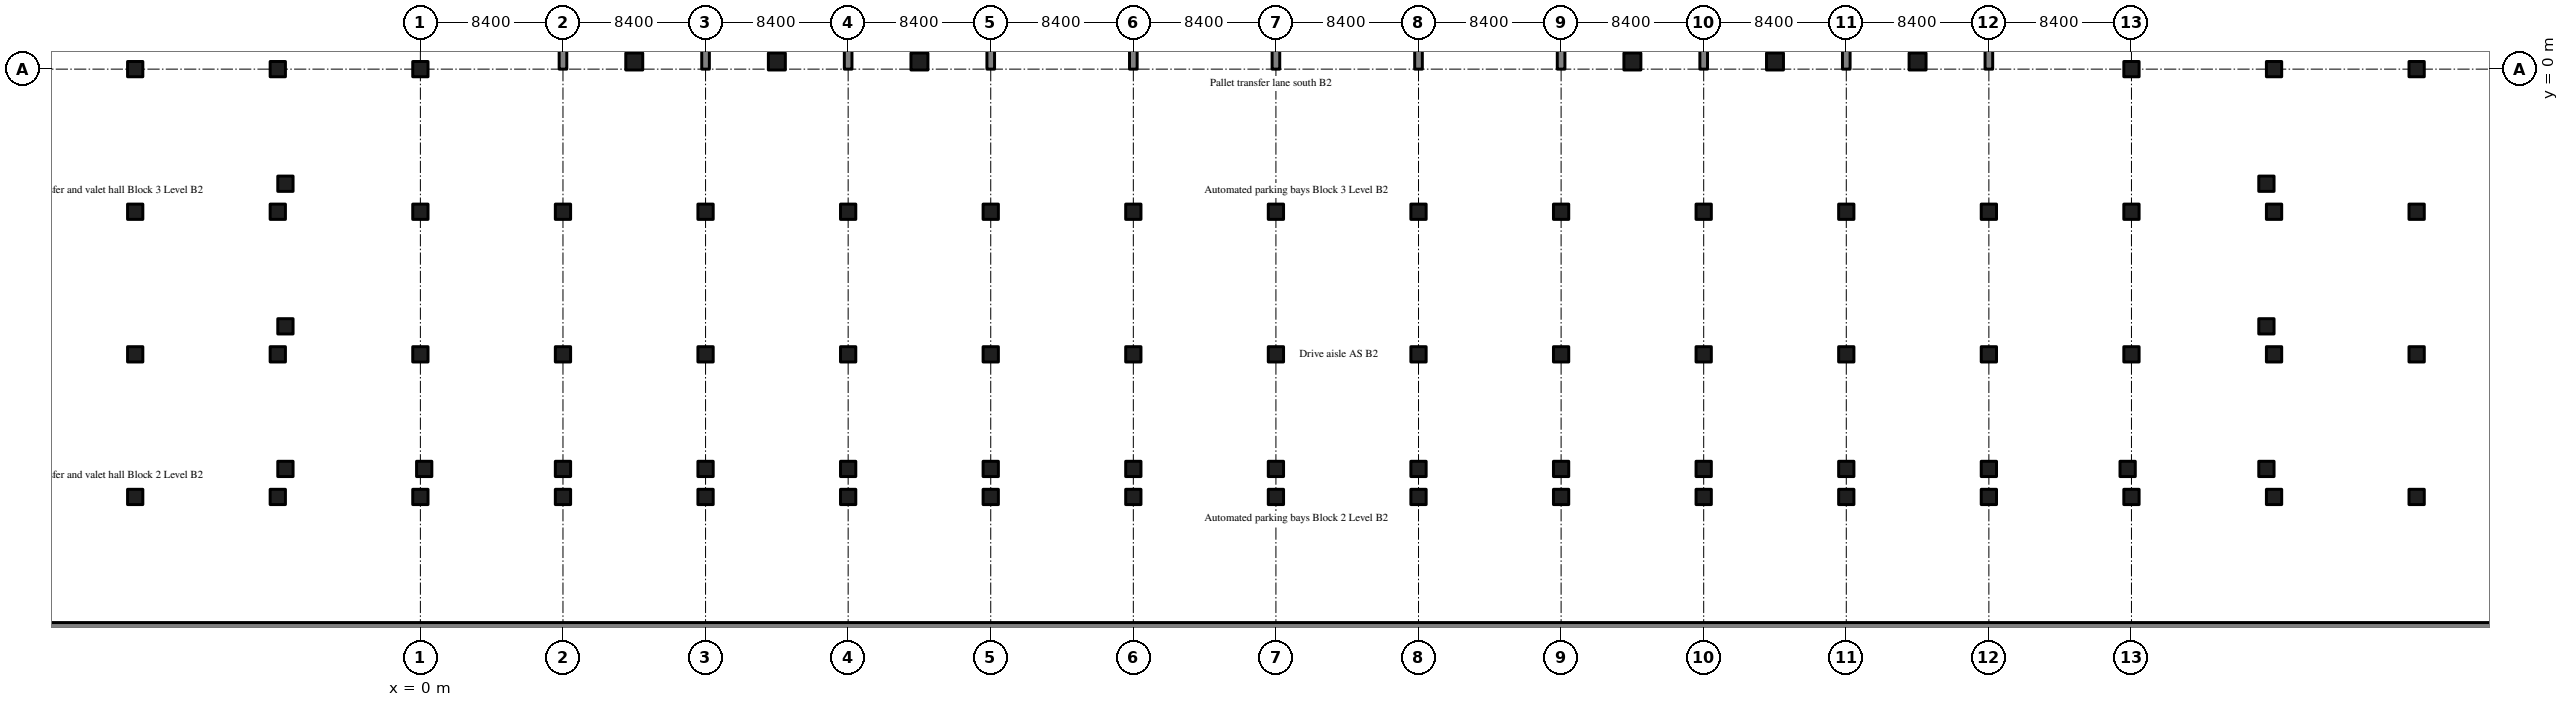
"""IFC4 building model, lengths in metres.
Left out: names, types, materials, properties, quantities, classifications, styles, units other than length and angle.
Written with IfcOpenShell. Run it as: python <this file> out.ifc"""

import sys

from ifc_helpers import new_model, si_unit, direction, frame, frame_2d, origin, origin_2d, place, context, subcontext, project, spatial, rectangle, extrude, source, transform, mapped, element, save


model = new_model("IFC4")
c1 = context("Model", 3, precision=1e-05, world=origin(), true_north=direction((0.0, 1.0)))
c2 = subcontext(c1, "Body", "Model", "MODEL_VIEW")
j1 = project(units=[si_unit("LENGTHUNIT", "METRE"), si_unit("PLANEANGLEUNIT", "RADIAN")], contexts=[c1])
p1 = place(None, origin())
s1 = spatial("IfcSite", under=j1, at=p1, CompositionType="ELEMENT")
p2 = place(p1, origin())
s2 = spatial("IfcBuilding", under=s1, at=p2, CompositionType="ELEMENT")
p3 = place(p2, frame((0.0, 0.0, -9.0)))
s3 = spatial("IfcBuildingStorey", under=s2, at=p3, CompositionType="ELEMENT", Elevation=-9.0)
m1 = source(origin(), c2, "Body", "SweptSolid", [
    extrude(rectangle(XDim=151.2, YDim=1.0, at=frame_2d((75.6, 0.0))), origin(), (0.0, 0.0, 1.0), 4.22),
])
p4 = place(p3, frame((-25.2, -33.1, 0.0), z_axis=(0.0, 0.0, 1.0), x_axis=(1.0, 0.0, 0.0)))
e1 = element("IfcWall", 1, at=p4, inside=s3, PredefinedType="SHEAR", context=c2, shape_type="MappedRepresentation", body=[
    mapped(m1, transform((0.0, 0.0, 0.0), scale=1.0)),
])
m2 = source(origin(), c2, "Body", "SweptSolid", [
    extrude(rectangle(XDim=19.6, YDim=0.45, at=frame_2d((9.8, 0.0))), origin(), (0.0, 0.0, 1.0), 4.22),
])
for number, where, z_axis, x_axis in (
    (2, (8.4, 0.0, 0.0), (0.0, 0.0, 1.0), (0.0, 1.0, 0.0)),
    (3, (16.8, 0.0, 0.0), (0.0, 0.0, 1.0), (0.0, 1.0, 0.0)),
    (4, (25.2, 0.0, 0.0), (0.0, 0.0, 1.0), (0.0, 1.0, 0.0)),
    (5, (33.6, 0.0, 0.0), (0.0, 0.0, 1.0), (0.0, 1.0, 0.0)),
    (6, (42.0, 0.0, 0.0), (0.0, 0.0, 1.0), (0.0, 1.0, 0.0)),
    (7, (50.4, 0.0, 0.0), (0.0, 0.0, 1.0), (0.0, 1.0, 0.0)),
    (8, (58.8, 0.0, 0.0), (0.0, 0.0, 1.0), (0.0, 1.0, 0.0)),
    (9, (67.2, 0.0, 0.0), (0.0, 0.0, 1.0), (0.0, 1.0, 0.0)),
    (10, (75.6, 0.0, 0.0), (0.0, 0.0, 1.0), (0.0, 1.0, 0.0)),
    (11, (84.0, 0.0, 0.0), (0.0, 0.0, 1.0), (0.0, 1.0, 0.0)),
    (12, (92.4, 0.0, 0.0), (0.0, 0.0, 1.0), (0.0, 1.0, 0.0)),
):
    element("IfcWall", number, at=place(p3, frame(where, z_axis=z_axis, x_axis=x_axis)), inside=s3, PredefinedType="SHEAR", context=c2, shape_type="MappedRepresentation", body=[
        mapped(m2, transform((0.0, 0.0, 0.0), scale=1.0)),
    ])
m3 = source(origin(), c2, "Body", "SweptSolid", [
    extrude(rectangle(XDim=1.0, YDim=1.0, at=origin_2d()), origin(), (0.0, 0.0, 1.0), 4.22),
])
for number, where, z_axis, x_axis in (
    (13, (12.6, 0.45, 0.0), (0.0, 0.0, 1.0), (1.0, 0.0, 0.0)),
    (14, (21.0, 0.45, 0.0), (0.0, 0.0, 1.0), (1.0, 0.0, 0.0)),
    (15, (29.4, 0.45, 0.0), (0.0, 0.0, 1.0), (1.0, 0.0, 0.0)),
    (16, (71.4, 0.45, 0.0), (0.0, 0.0, 1.0), (1.0, 0.0, 0.0)),
    (17, (79.8, 0.45, 0.0), (0.0, 0.0, 1.0), (1.0, 0.0, 0.0)),
    (18, (88.2, 0.45, 0.0), (0.0, 0.0, 1.0), (1.0, 0.0, 0.0)),
):
    element("IfcColumn", number, at=place(p3, frame(where, z_axis=z_axis, x_axis=x_axis)), inside=s3, PredefinedType="COLUMN", context=c2, shape_type="MappedRepresentation", body=[
        mapped(m3, transform((0.0, 0.0, 0.0), scale=1.0)),
    ])
m4 = source(origin(), c2, "Body", "SweptSolid", [
    extrude(rectangle(XDim=0.9, YDim=0.9, at=origin_2d()), origin(), (0.0, 0.0, 1.0), 4.22),
])
for number, where, z_axis, x_axis in (
    (19, (-7.95, -23.55, 0.0), (0.0, 0.0, 1.0), (1.0, 0.0, 0.0)),
    (20, (108.75, -23.55, 0.0), (0.0, 0.0, 1.0), (1.0, 0.0, 0.0)),
    (21, (-7.95, -15.15, 0.0), (0.0, 0.0, 1.0), (1.0, 0.0, 0.0)),
    (22, (108.75, -15.15, 0.0), (0.0, 0.0, 1.0), (1.0, 0.0, 0.0)),
    (23, (-7.95, -6.75, 0.0), (0.0, 0.0, 1.0), (1.0, 0.0, 0.0)),
    (24, (108.75, -6.75, 0.0), (0.0, 0.0, 1.0), (1.0, 0.0, 0.0)),
    (25, (0.225, -23.55, 0.0), (0.0, 0.0, 1.0), (1.0, 0.0, 0.0)),
    (26, (8.4, -23.55, 0.0), (0.0, 0.0, 1.0), (1.0, 0.0, 0.0)),
    (27, (16.8, -23.55, 0.0), (0.0, 0.0, 1.0), (1.0, 0.0, 0.0)),
    (28, (25.2, -23.55, 0.0), (0.0, 0.0, 1.0), (1.0, 0.0, 0.0)),
    (29, (33.6, -23.55, 0.0), (0.0, 0.0, 1.0), (1.0, 0.0, 0.0)),
    (30, (42.0, -23.55, 0.0), (0.0, 0.0, 1.0), (1.0, 0.0, 0.0)),
    (31, (50.4, -23.55, 0.0), (0.0, 0.0, 1.0), (1.0, 0.0, 0.0)),
    (32, (58.8, -23.55, 0.0), (0.0, 0.0, 1.0), (1.0, 0.0, 0.0)),
    (33, (67.2, -23.55, 0.0), (0.0, 0.0, 1.0), (1.0, 0.0, 0.0)),
    (34, (75.6, -23.55, 0.0), (0.0, 0.0, 1.0), (1.0, 0.0, 0.0)),
    (35, (84.0, -23.55, 0.0), (0.0, 0.0, 1.0), (1.0, 0.0, 0.0)),
    (36, (92.4, -23.55, 0.0), (0.0, 0.0, 1.0), (1.0, 0.0, 0.0)),
    (37, (100.575, -23.55, 0.0), (0.0, 0.0, 1.0), (1.0, 0.0, 0.0)),
    (38, (-16.8, -25.2, 0.0), (0.0, 0.0, 1.0), (1.0, 0.0, 0.0)),
    (39, (-16.8, -16.8, 0.0), (0.0, 0.0, 1.0), (1.0, 0.0, 0.0)),
    (40, (-16.8, -8.4, 0.0), (0.0, 0.0, 1.0), (1.0, 0.0, 0.0)),
    (41, (-16.8, 0.0, 0.0), (0.0, 0.0, 1.0), (1.0, 0.0, 0.0)),
    (42, (-8.4, -25.2, 0.0), (0.0, 0.0, 1.0), (1.0, 0.0, 0.0)),
    (43, (-8.4, -16.8, 0.0), (0.0, 0.0, 1.0), (1.0, 0.0, 0.0)),
    (44, (-8.4, -8.4, 0.0), (0.0, 0.0, 1.0), (1.0, 0.0, 0.0)),
    (45, (-8.4, 0.0, 0.0), (0.0, 0.0, 1.0), (1.0, 0.0, 0.0)),
    (46, (0.0, -25.2, 0.0), (0.0, 0.0, 1.0), (1.0, 0.0, 0.0)),
    (47, (0.0, -16.8, 0.0), (0.0, 0.0, 1.0), (1.0, 0.0, 0.0)),
    (48, (0.0, -8.4, 0.0), (0.0, 0.0, 1.0), (1.0, 0.0, 0.0)),
    (49, (0.0, 0.0, 0.0), (0.0, 0.0, 1.0), (1.0, 0.0, 0.0)),
    (50, (8.4, -25.2, 0.0), (0.0, 0.0, 1.0), (1.0, 0.0, 0.0)),
    (51, (8.4, -16.8, 0.0), (0.0, 0.0, 1.0), (1.0, 0.0, 0.0)),
    (52, (8.4, -8.4, 0.0), (0.0, 0.0, 1.0), (1.0, 0.0, 0.0)),
    (53, (16.8, -25.2, 0.0), (0.0, 0.0, 1.0), (1.0, 0.0, 0.0)),
    (54, (16.8, -16.8, 0.0), (0.0, 0.0, 1.0), (1.0, 0.0, 0.0)),
    (55, (16.8, -8.4, 0.0), (0.0, 0.0, 1.0), (1.0, 0.0, 0.0)),
    (56, (25.2, -25.2, 0.0), (0.0, 0.0, 1.0), (1.0, 0.0, 0.0)),
    (57, (25.2, -16.8, 0.0), (0.0, 0.0, 1.0), (1.0, 0.0, 0.0)),
    (58, (25.2, -8.4, 0.0), (0.0, 0.0, 1.0), (1.0, 0.0, 0.0)),
    (59, (33.6, -25.2, 0.0), (0.0, 0.0, 1.0), (1.0, 0.0, 0.0)),
    (60, (33.6, -16.8, 0.0), (0.0, 0.0, 1.0), (1.0, 0.0, 0.0)),
    (61, (33.6, -8.4, 0.0), (0.0, 0.0, 1.0), (1.0, 0.0, 0.0)),
    (62, (42.0, -25.2, 0.0), (0.0, 0.0, 1.0), (1.0, 0.0, 0.0)),
    (63, (42.0, -16.8, 0.0), (0.0, 0.0, 1.0), (1.0, 0.0, 0.0)),
    (64, (42.0, -8.4, 0.0), (0.0, 0.0, 1.0), (1.0, 0.0, 0.0)),
    (65, (50.4, -25.2, 0.0), (0.0, 0.0, 1.0), (1.0, 0.0, 0.0)),
    (66, (50.4, -16.8, 0.0), (0.0, 0.0, 1.0), (1.0, 0.0, 0.0)),
    (67, (50.4, -8.4, 0.0), (0.0, 0.0, 1.0), (1.0, 0.0, 0.0)),
    (68, (58.8, -25.2, 0.0), (0.0, 0.0, 1.0), (1.0, 0.0, 0.0)),
    (69, (58.8, -16.8, 0.0), (0.0, 0.0, 1.0), (1.0, 0.0, 0.0)),
    (70, (58.8, -8.4, 0.0), (0.0, 0.0, 1.0), (1.0, 0.0, 0.0)),
    (71, (67.2, -25.2, 0.0), (0.0, 0.0, 1.0), (1.0, 0.0, 0.0)),
    (72, (67.2, -16.8, 0.0), (0.0, 0.0, 1.0), (1.0, 0.0, 0.0)),
    (73, (67.2, -8.4, 0.0), (0.0, 0.0, 1.0), (1.0, 0.0, 0.0)),
    (74, (75.6, -25.2, 0.0), (0.0, 0.0, 1.0), (1.0, 0.0, 0.0)),
    (75, (75.6, -16.8, 0.0), (0.0, 0.0, 1.0), (1.0, 0.0, 0.0)),
    (76, (75.6, -8.4, 0.0), (0.0, 0.0, 1.0), (1.0, 0.0, 0.0)),
    (77, (84.0, -25.2, 0.0), (0.0, 0.0, 1.0), (1.0, 0.0, 0.0)),
    (78, (84.0, -16.8, 0.0), (0.0, 0.0, 1.0), (1.0, 0.0, 0.0)),
    (79, (84.0, -8.4, 0.0), (0.0, 0.0, 1.0), (1.0, 0.0, 0.0)),
    (80, (92.4, -25.2, 0.0), (0.0, 0.0, 1.0), (1.0, 0.0, 0.0)),
    (81, (92.4, -16.8, 0.0), (0.0, 0.0, 1.0), (1.0, 0.0, 0.0)),
    (82, (92.4, -8.4, 0.0), (0.0, 0.0, 1.0), (1.0, 0.0, 0.0)),
    (83, (100.8, -25.2, 0.0), (0.0, 0.0, 1.0), (1.0, 0.0, 0.0)),
    (84, (100.8, -16.8, 0.0), (0.0, 0.0, 1.0), (1.0, 0.0, 0.0)),
    (85, (100.8, -8.4, 0.0), (0.0, 0.0, 1.0), (1.0, 0.0, 0.0)),
    (86, (100.8, 0.0, 0.0), (0.0, 0.0, 1.0), (1.0, 0.0, 0.0)),
    (87, (109.2, -25.2, 0.0), (0.0, 0.0, 1.0), (1.0, 0.0, 0.0)),
    (88, (109.2, -16.8, 0.0), (0.0, 0.0, 1.0), (1.0, 0.0, 0.0)),
    (89, (109.2, -8.4, 0.0), (0.0, 0.0, 1.0), (1.0, 0.0, 0.0)),
    (90, (109.2, 0.0, 0.0), (0.0, 0.0, 1.0), (1.0, 0.0, 0.0)),
    (91, (117.6, -25.2, 0.0), (0.0, 0.0, 1.0), (1.0, 0.0, 0.0)),
    (92, (117.6, -16.8, 0.0), (0.0, 0.0, 1.0), (1.0, 0.0, 0.0)),
    (93, (117.6, -8.4, 0.0), (0.0, 0.0, 1.0), (1.0, 0.0, 0.0)),
    (94, (117.6, 0.0, 0.0), (0.0, 0.0, 1.0), (1.0, 0.0, 0.0)),
):
    element("IfcColumn", number, at=place(p3, frame(where, z_axis=z_axis, x_axis=x_axis)), inside=s3, PredefinedType="COLUMN", context=c2, shape_type="MappedRepresentation", body=[
        mapped(m4, transform((0.0, 0.0, 0.0), scale=1.0)),
    ])
save(model, sys.argv[1])
